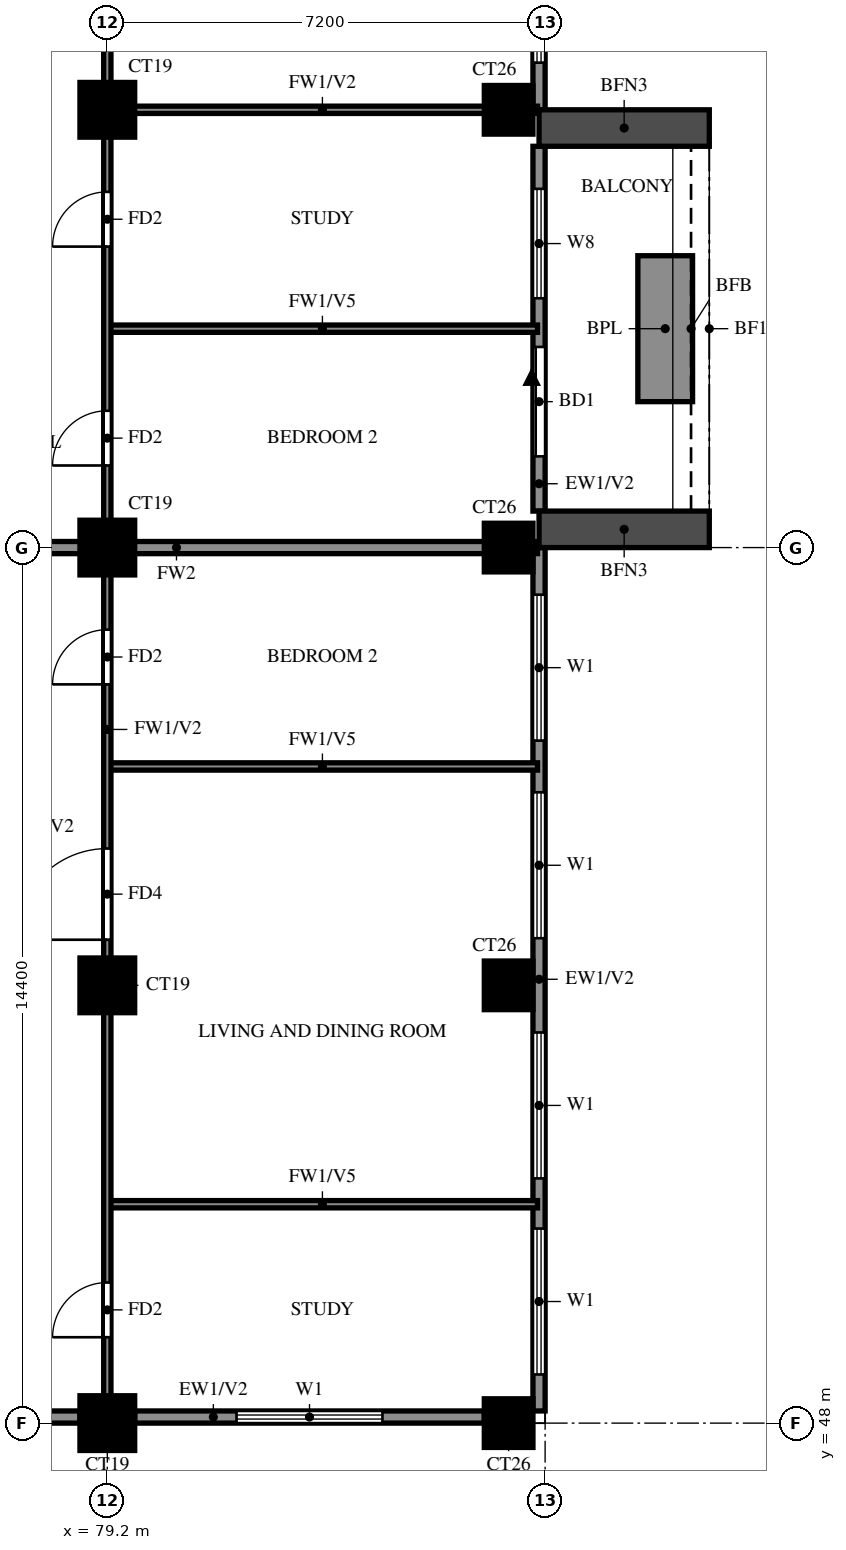
"""IFC4 building model, lengths in metres.
Left out: names, types, materials, properties, quantities, classifications, styles, units other than length and angle.
Written with IfcOpenShell. Run it as: python <this file> out.ifc"""

import sys

from ifc_helpers import new_model, si_unit, direction, frame, frame_2d, origin, origin_2d, place, context, subcontext, project, spatial, rectangle, extrude, source, transform, mapped, element, fill, save


model = new_model("IFC4")
c1 = context("Model", 3, precision=1e-05, world=origin(), true_north=direction((0.0, 1.0)))
c2 = subcontext(c1, "Body", "Model", "MODEL_VIEW")
j1 = project(units=[si_unit("LENGTHUNIT", "METRE"), si_unit("PLANEANGLEUNIT", "RADIAN")], contexts=[c1])
p1 = place(None, origin())
s1 = spatial("IfcSite", under=j1, at=p1, CompositionType="ELEMENT")
p2 = place(p1, origin())
s2 = spatial("IfcBuilding", under=s1, at=p2, CompositionType="ELEMENT")
p3 = place(p2, frame((0.0, 0.0, 192.0)))
s3 = spatial("IfcBuildingStorey", under=s2, at=p3, CompositionType="ELEMENT", Elevation=192.0)
m1 = source(origin(), c2, "Body", "SweptSolid", [
    extrude(rectangle(XDim=0.9, YDim=0.9, at=origin_2d()), origin(), (0.0, 0.0, 1.0), 3.2),
])
p4 = place(p3, frame((79.2, 48.0, 0.0), z_axis=(0.0, 0.0, 1.0), x_axis=(1.0, 0.0, 0.0)))
e1 = element("IfcColumn", 1, at=p4, inside=s3, PredefinedType="COLUMN", context=c2, shape_type="MappedRepresentation", body=[
    mapped(m1, transform((0.0, 0.0, 0.0))),
])
m2 = source(origin(), c2, "Body", "SweptSolid", [
    extrude(rectangle(XDim=0.8, YDim=0.8, at=origin_2d()), origin(), (0.0, 0.0, 1.0), 3.2),
])
p5 = place(p3, frame((85.8, 48.0, 0.0), z_axis=(0.0, 0.0, 1.0), x_axis=(1.0, 0.0, 0.0)))
e2 = element("IfcColumn", 2, at=p5, inside=s3, PredefinedType="COLUMN", context=c2, shape_type="MappedRepresentation", body=[
    mapped(m2, transform((0.0, 0.0, 0.0))),
])
p6 = place(p3, frame((79.2, 55.2, 0.0), z_axis=(0.0, 0.0, 1.0), x_axis=(1.0, 0.0, 0.0)))
e3 = element("IfcColumn", 3, at=p6, inside=s3, PredefinedType="COLUMN", context=c2, shape_type="MappedRepresentation", body=[
    mapped(m1, transform((0.0, 0.0, 0.0))),
])
p7 = place(p3, frame((85.8, 55.2, 0.0), z_axis=(0.0, 0.0, 1.0), x_axis=(1.0, 0.0, 0.0)))
e4 = element("IfcColumn", 4, at=p7, inside=s3, PredefinedType="COLUMN", context=c2, shape_type="MappedRepresentation", body=[
    mapped(m2, transform((0.0, 0.0, 0.0))),
])
p8 = place(p3, frame((79.2, 62.4, 0.0), z_axis=(0.0, 0.0, 1.0), x_axis=(1.0, 0.0, 0.0)))
e5 = element("IfcColumn", 5, at=p8, inside=s3, PredefinedType="COLUMN", context=c2, shape_type="MappedRepresentation", body=[
    mapped(m1, transform((0.0, 0.0, 0.0))),
])
p9 = place(p3, frame((85.8, 62.4, 0.0), z_axis=(0.0, 0.0, 1.0), x_axis=(1.0, 0.0, 0.0)))
e6 = element("IfcColumn", 6, at=p9, inside=s3, PredefinedType="COLUMN", context=c2, shape_type="MappedRepresentation", body=[
    mapped(m2, transform((0.0, 0.0, 0.0))),
])
p10 = place(p3, frame((79.2, 69.6, 0.0), z_axis=(0.0, 0.0, 1.0), x_axis=(1.0, 0.0, 0.0)))
e7 = element("IfcColumn", 7, at=p10, inside=s3, PredefinedType="COLUMN", context=c2, shape_type="MappedRepresentation", body=[
    mapped(m1, transform((0.0, 0.0, 0.0))),
])
p11 = place(p3, frame((85.8, 69.6, 0.0), z_axis=(0.0, 0.0, 1.0), x_axis=(1.0, 0.0, 0.0)))
e8 = element("IfcColumn", 8, at=p11, inside=s3, PredefinedType="COLUMN", context=c2, shape_type="MappedRepresentation", body=[
    mapped(m2, transform((0.0, 0.0, 0.0))),
])
p12 = place(p3, frame((85.719, 39.881, 0.0), z_axis=(0.0, 0.0, 1.0), x_axis=(-0.86377618652, 0.503875678716, 0.0)))
e9 = element("IfcWall", 9, at=p12, inside=s3, PredefinedType="SOLIDWALL", context=c2, shape_type="SweptSolid", body=[
    extrude(rectangle(XDim=16.311, YDim=0.2, at=frame_2d((8.156, 0.0))), origin(), (0.0, 0.0, 1.0), 3.2),
])
p13 = place(p12, frame((13.326, 0.0, 1.5)))
e10 = element("IfcOpeningElement", 10, at=p13, cuts=e9, PredefinedType="OPENING", context=c2, shape_type="SweptSolid", body=[
    extrude(rectangle(XDim=0.9, YDim=0.9, at=frame_2d((0.45, 0.45))), frame((0.0, 0.11, 0.0), z_axis=(0.0, -1.0, 0.0), x_axis=(1.0, 0.0, 0.0)), (0.0, 0.0, 1.0), 0.22),
])
p14 = place(p3, frame((71.99, 48.1, 0.0), z_axis=(0.0, 0.0, 1.0), x_axis=(1.0, 0.0, 0.0)))
e11 = element("IfcWall", 11, at=p14, inside=s3, PredefinedType="SOLIDWALL", context=c2, shape_type="SweptSolid", body=[
    extrude(rectangle(XDim=6.76, YDim=0.2, at=frame_2d((3.38, 0.0))), origin(), (0.0, 0.0, 1.0), 3.2),
])
p15 = place(p14, frame((2.205, 0.0, 1.5)))
e12 = element("IfcOpeningElement", 12, at=p15, cuts=e11, PredefinedType="OPENING", context=c2, shape_type="SweptSolid", body=[
    extrude(rectangle(XDim=0.9, YDim=0.9, at=frame_2d((0.45, 0.45))), frame((0.0, 0.11, 0.0), z_axis=(0.0, -1.0, 0.0), x_axis=(1.0, 0.0, 0.0)), (0.0, 0.0, 1.0), 0.22),
])
p16 = place(p3, frame((79.65, 48.1, 0.0), z_axis=(0.0, 0.0, 1.0), x_axis=(1.0, 0.0, 0.0)))
e13 = element("IfcWall", 13, at=p16, inside=s3, PredefinedType="SOLIDWALL", context=c2, shape_type="SweptSolid", body=[
    extrude(rectangle(XDim=5.75, YDim=0.2, at=frame_2d((2.875, 0.0))), origin(), (0.0, 0.0, 1.0), 3.2),
])
p17 = place(p16, frame((1.675, 0.0, 0.6)))
e14 = element("IfcOpeningElement", 14, at=p17, cuts=e13, PredefinedType="OPENING", context=c2, shape_type="SweptSolid", body=[
    extrude(rectangle(XDim=2.4, YDim=2.4, at=frame_2d((1.2, 1.2))), frame((0.0, 0.11, 0.0), z_axis=(0.0, -1.0, 0.0), x_axis=(1.0, 0.0, 0.0)), (0.0, 0.0, 1.0), 0.22),
])
p18 = place(p3, frame((86.3, 48.2, 0.0), z_axis=(0.0, 0.0, 1.0), x_axis=(0.0, 1.0, 0.0)))
e15 = element("IfcWall", 15, at=p18, inside=s3, PredefinedType="SOLIDWALL", context=c2, shape_type="SweptSolid", body=[
    extrude(rectangle(XDim=14.2, YDim=0.2, at=frame_2d((7.1, 0.0))), origin(), (0.0, 0.0, 1.0), 3.2),
])
p19 = place(p18, frame((0.6, 0.0, 0.6)))
e16 = element("IfcOpeningElement", 16, at=p19, cuts=e15, PredefinedType="OPENING", context=c2, shape_type="SweptSolid", body=[
    extrude(rectangle(XDim=2.4, YDim=2.4, at=frame_2d((1.2, 1.2))), frame((0.0, 0.11, 0.0), z_axis=(0.0, -1.0, 0.0), x_axis=(1.0, 0.0, 0.0)), (0.0, 0.0, 1.0), 0.22),
])
p20 = place(p18, frame((3.825, 0.0, 0.6)))
e17 = element("IfcOpeningElement", 17, at=p20, cuts=e15, PredefinedType="OPENING", context=c2, shape_type="SweptSolid", body=[
    extrude(rectangle(XDim=2.4, YDim=2.4, at=frame_2d((1.2, 1.2))), frame((0.0, 0.11, 0.0), z_axis=(0.0, -1.0, 0.0), x_axis=(1.0, 0.0, 0.0)), (0.0, 0.0, 1.0), 0.22),
])
p21 = place(p18, frame((7.775, 0.0, 0.6)))
e18 = element("IfcOpeningElement", 18, at=p21, cuts=e15, PredefinedType="OPENING", context=c2, shape_type="SweptSolid", body=[
    extrude(rectangle(XDim=2.4, YDim=2.4, at=frame_2d((1.2, 1.2))), frame((0.0, 0.11, 0.0), z_axis=(0.0, -1.0, 0.0), x_axis=(1.0, 0.0, 0.0)), (0.0, 0.0, 1.0), 0.22),
])
p22 = place(p18, frame((11.025, 0.0, 0.6)))
e19 = element("IfcOpeningElement", 19, at=p22, cuts=e15, PredefinedType="OPENING", context=c2, shape_type="SweptSolid", body=[
    extrude(rectangle(XDim=2.4, YDim=2.4, at=frame_2d((1.2, 1.2))), frame((0.0, 0.11, 0.0), z_axis=(0.0, -1.0, 0.0), x_axis=(1.0, 0.0, 0.0)), (0.0, 0.0, 1.0), 0.22),
])
p23 = place(p3, frame((86.3, 63.0, 0.0), z_axis=(0.0, 0.0, 1.0), x_axis=(0.0, 1.0, 0.0)))
e20 = element("IfcWall", 20, at=p23, inside=s3, PredefinedType="SOLIDWALL", context=c2, shape_type="SweptSolid", body=[
    extrude(rectangle(XDim=6.0, YDim=0.2, at=frame_2d((3.0, 0.0))), origin(), (0.0, 0.0, 1.0), 3.2),
])
p24 = place(p23, frame((0.9, 0.0, 0.0)))
e21 = element("IfcOpeningElement", 21, at=p24, cuts=e20, PredefinedType="OPENING", context=c2, shape_type="SweptSolid", body=[
    extrude(rectangle(XDim=1.8, YDim=2.4, at=frame_2d((0.9, 1.2))), frame((0.0, 0.11, 0.0), z_axis=(0.0, -1.0, 0.0), x_axis=(1.0, 0.0, 0.0)), (0.0, 0.0, 1.0), 0.22),
])
p25 = place(p23, frame((3.5, 0.0, 0.6)))
e22 = element("IfcOpeningElement", 22, at=p25, cuts=e20, PredefinedType="OPENING", context=c2, shape_type="SweptSolid", body=[
    extrude(rectangle(XDim=1.8, YDim=2.4, at=frame_2d((0.9, 1.2))), frame((0.0, 0.11, 0.0), z_axis=(0.0, -1.0, 0.0), x_axis=(1.0, 0.0, 0.0)), (0.0, 0.0, 1.0), 0.22),
])
p26 = place(p3, frame((86.3, 69.6, 0.0), z_axis=(0.0, 0.0, 1.0), x_axis=(0.0, 1.0, 0.0)))
e23 = element("IfcWall", 23, at=p26, inside=s3, PredefinedType="SOLIDWALL", context=c2, shape_type="SweptSolid", body=[
    extrude(rectangle(XDim=7.2, YDim=0.2, at=frame_2d((3.6, 0.0))), origin(), (0.0, 0.0, 1.0), 3.2),
])
p27 = place(p26, frame((0.775, 0.0, 0.6)))
e24 = element("IfcOpeningElement", 24, at=p27, cuts=e23, PredefinedType="OPENING", context=c2, shape_type="SweptSolid", body=[
    extrude(rectangle(XDim=2.4, YDim=2.4, at=frame_2d((1.2, 1.2))), frame((0.0, 0.11, 0.0), z_axis=(0.0, -1.0, 0.0), x_axis=(1.0, 0.0, 0.0)), (0.0, 0.0, 1.0), 0.22),
])
p28 = place(p26, frame((4.025, 0.0, 0.6)))
e25 = element("IfcOpeningElement", 25, at=p28, cuts=e23, PredefinedType="OPENING", context=c2, shape_type="SweptSolid", body=[
    extrude(rectangle(XDim=2.4, YDim=2.4, at=frame_2d((1.2, 1.2))), frame((0.0, 0.11, 0.0), z_axis=(0.0, -1.0, 0.0), x_axis=(1.0, 0.0, 0.0)), (0.0, 0.0, 1.0), 0.22),
])
for number, where, z_axis, x_axis in (
    (26, (86.3, 62.7, 0.0), (0.0, 0.0, 1.0), (1.0, 0.0, 0.0)),
    (27, (86.3, 69.3, 0.0), (0.0, 0.0, 1.0), (1.0, 0.0, 0.0)),
):
    element("IfcWall", number, at=place(p3, frame(where, z_axis=z_axis, x_axis=x_axis)), inside=s3, PredefinedType="SOLIDWALL", context=c2, shape_type="SweptSolid", body=[
        extrude(rectangle(XDim=2.8, YDim=0.6, at=frame_2d((1.4, 0.0))), origin(), (0.0, 0.0, 1.0), 2.85),
    ])
p29 = place(p3, frame((88.375, 64.8, 0.0), z_axis=(0.0, 0.0, 1.0), x_axis=(0.0, 1.0, 0.0)))
e28 = element("IfcWall", 28, at=p29, inside=s3, PredefinedType="SOLIDWALL", context=c2, shape_type="SweptSolid", body=[
    extrude(rectangle(XDim=2.4, YDim=0.9, at=frame_2d((1.2, 0.0))), origin(), (0.0, 0.0, 1.0), 0.9),
])
p30 = place(p3, frame((74.4, 62.4, 0.0), z_axis=(0.0, 0.0, 1.0), x_axis=(1.0, 0.0, 0.0)))
e29 = element("IfcWall", 29, at=p30, inside=s3, PredefinedType="SOLIDWALL", context=c2, shape_type="SweptSolid", body=[
    extrude(rectangle(XDim=11.875, YDim=0.2, at=frame_2d((5.938, 0.0))), origin(), (0.0, 0.0, 1.0), 3.2),
])
for number, where, z_axis, x_axis in (
    (30, (79.2, 51.6, 0.0), (0.0, 0.0, 1.0), (1.0, 0.0, 0.0)),
    (31, (79.2, 58.8, 0.0), (0.0, 0.0, 1.0), (1.0, 0.0, 0.0)),
    (32, (79.2, 66.0, 0.0), (0.0, 0.0, 1.0), (1.0, 0.0, 0.0)),
):
    element("IfcWall", number, at=place(p3, frame(where, z_axis=z_axis, x_axis=x_axis)), inside=s3, PredefinedType="PARTITIONING", context=c2, shape_type="SweptSolid", body=[
        extrude(rectangle(XDim=7.075, YDim=0.12, at=frame_2d((3.538, 0.0))), origin(), (0.0, 0.0, 1.0), 2.3),
    ])
p31 = place(p3, frame((79.2, 69.6, 0.0), z_axis=(0.0, 0.0, 1.0), x_axis=(1.0, 0.0, 0.0)))
e33 = element("IfcWall", 33, at=p31, inside=s3, PredefinedType="PARTITIONING", context=c2, shape_type="SweptSolid", body=[
    extrude(rectangle(XDim=7.075, YDim=0.12, at=frame_2d((3.538, 0.0))), origin(), (0.0, 0.0, 1.0), 3.2),
])
p32 = place(p3, frame((79.2, 48.125, 0.0), z_axis=(0.0, 0.0, 1.0), x_axis=(0.0, 1.0, 0.0)))
e34 = element("IfcWall", 34, at=p32, inside=s3, PredefinedType="PARTITIONING", context=c2, shape_type="SweptSolid", body=[
    extrude(rectangle(XDim=25.075, YDim=0.12, at=frame_2d((12.538, 0.0))), origin(), (0.0, 0.0, 1.0), 3.2),
])
p33 = place(p32, frame((1.288, 0.0, 0.0)))
e35 = element("IfcOpeningElement", 35, at=p33, cuts=e34, PredefinedType="OPENING", context=c2, shape_type="SweptSolid", body=[
    extrude(rectangle(XDim=0.9, YDim=2.1, at=frame_2d((0.45, 1.05))), frame((0.0, 0.07, 0.0), z_axis=(0.0, -1.0, 0.0), x_axis=(1.0, 0.0, 0.0)), (0.0, 0.0, 1.0), 0.14),
])
p34 = place(p32, frame((7.825, 0.0, 0.0)))
e36 = element("IfcOpeningElement", 36, at=p34, cuts=e34, PredefinedType="OPENING", context=c2, shape_type="SweptSolid", body=[
    extrude(rectangle(XDim=1.5, YDim=2.1, at=frame_2d((0.75, 1.05))), frame((0.0, 0.07, 0.0), z_axis=(0.0, -1.0, 0.0), x_axis=(1.0, 0.0, 0.0)), (0.0, 0.0, 1.0), 0.14),
])
p35 = place(p32, frame((12.025, 0.0, 0.0)))
e37 = element("IfcOpeningElement", 37, at=p35, cuts=e34, PredefinedType="OPENING", context=c2, shape_type="SweptSolid", body=[
    extrude(rectangle(XDim=0.9, YDim=2.1, at=frame_2d((0.45, 1.05))), frame((0.0, 0.07, 0.0), z_axis=(0.0, -1.0, 0.0), x_axis=(1.0, 0.0, 0.0)), (0.0, 0.0, 1.0), 0.14),
])
p36 = place(p32, frame((15.625, 0.0, 0.0)))
e38 = element("IfcOpeningElement", 38, at=p36, cuts=e34, PredefinedType="OPENING", context=c2, shape_type="SweptSolid", body=[
    extrude(rectangle(XDim=0.9, YDim=2.1, at=frame_2d((0.45, 1.05))), frame((0.0, 0.07, 0.0), z_axis=(0.0, -1.0, 0.0), x_axis=(1.0, 0.0, 0.0)), (0.0, 0.0, 1.0), 0.14),
])
p37 = place(p32, frame((19.225, 0.0, 0.0)))
e39 = element("IfcOpeningElement", 39, at=p37, cuts=e34, PredefinedType="OPENING", context=c2, shape_type="SweptSolid", body=[
    extrude(rectangle(XDim=0.9, YDim=2.1, at=frame_2d((0.45, 1.05))), frame((0.0, 0.07, 0.0), z_axis=(0.0, -1.0, 0.0), x_axis=(1.0, 0.0, 0.0)), (0.0, 0.0, 1.0), 0.14),
])
p38 = place(p32, frame((22.825, 0.0, 0.0)))
e40 = element("IfcOpeningElement", 40, at=p38, cuts=e34, PredefinedType="OPENING", context=c2, shape_type="SweptSolid", body=[
    extrude(rectangle(XDim=0.9, YDim=2.1, at=frame_2d((0.45, 1.05))), frame((0.0, 0.07, 0.0), z_axis=(0.0, -1.0, 0.0), x_axis=(1.0, 0.0, 0.0)), (0.0, 0.0, 1.0), 0.14),
])
p39 = place(p17, origin())
e41 = element("IfcWindow", 41, at=p39, inside=s3, PartitioningType="DOUBLE_PANEL_VERTICAL", PredefinedType="WINDOW", context=c2, shape_type="SweptSolid", body=[
    extrude(rectangle(XDim=2.4, YDim=2.4, at=frame_2d((1.2, 1.2))), frame((0.0, 0.03, 0.0), z_axis=(0.0, -1.0, 0.0), x_axis=(1.0, 0.0, 0.0)), (0.0, 0.0, 1.0), 0.06),
])
fill(e14, e41)
p40 = place(p19, origin())
e42 = element("IfcWindow", 42, at=p40, inside=s3, PartitioningType="DOUBLE_PANEL_VERTICAL", PredefinedType="WINDOW", context=c2, shape_type="SweptSolid", body=[
    extrude(rectangle(XDim=2.4, YDim=2.4, at=frame_2d((1.2, 1.2))), frame((0.0, 0.03, 0.0), z_axis=(0.0, -1.0, 0.0), x_axis=(1.0, 0.0, 0.0)), (0.0, 0.0, 1.0), 0.06),
])
fill(e16, e42)
p41 = place(p20, origin())
e43 = element("IfcWindow", 43, at=p41, inside=s3, PartitioningType="DOUBLE_PANEL_VERTICAL", PredefinedType="WINDOW", context=c2, shape_type="SweptSolid", body=[
    extrude(rectangle(XDim=2.4, YDim=2.4, at=frame_2d((1.2, 1.2))), frame((0.0, 0.03, 0.0), z_axis=(0.0, -1.0, 0.0), x_axis=(1.0, 0.0, 0.0)), (0.0, 0.0, 1.0), 0.06),
])
fill(e17, e43)
p42 = place(p21, origin())
e44 = element("IfcWindow", 44, at=p42, inside=s3, PartitioningType="DOUBLE_PANEL_VERTICAL", PredefinedType="WINDOW", context=c2, shape_type="SweptSolid", body=[
    extrude(rectangle(XDim=2.4, YDim=2.4, at=frame_2d((1.2, 1.2))), frame((0.0, 0.03, 0.0), z_axis=(0.0, -1.0, 0.0), x_axis=(1.0, 0.0, 0.0)), (0.0, 0.0, 1.0), 0.06),
])
fill(e18, e44)
p43 = place(p22, origin())
e45 = element("IfcWindow", 45, at=p43, inside=s3, PartitioningType="DOUBLE_PANEL_VERTICAL", PredefinedType="WINDOW", context=c2, shape_type="SweptSolid", body=[
    extrude(rectangle(XDim=2.4, YDim=2.4, at=frame_2d((1.2, 1.2))), frame((0.0, 0.03, 0.0), z_axis=(0.0, -1.0, 0.0), x_axis=(1.0, 0.0, 0.0)), (0.0, 0.0, 1.0), 0.06),
])
fill(e19, e45)
p44 = place(p24, origin())
e46 = element("IfcDoor", 46, at=p44, inside=s3, OperationType="DOUBLE_DOOR_SLIDING", PredefinedType="DOOR", context=c2, shape_type="SweptSolid", body=[
    extrude(rectangle(XDim=1.8, YDim=2.4, at=frame_2d((0.9, 1.2))), frame((0.0, 0.025, 0.0), z_axis=(0.0, -1.0, 0.0), x_axis=(1.0, 0.0, 0.0)), (0.0, 0.0, 1.0), 0.05),
])
fill(e21, e46)
p45 = place(p25, origin())
e47 = element("IfcWindow", 47, at=p45, inside=s3, PartitioningType="DOUBLE_PANEL_VERTICAL", PredefinedType="WINDOW", context=c2, shape_type="SweptSolid", body=[
    extrude(rectangle(XDim=1.8, YDim=2.4, at=frame_2d((0.9, 1.2))), frame((0.0, 0.03, 0.0), z_axis=(0.0, -1.0, 0.0), x_axis=(1.0, 0.0, 0.0)), (0.0, 0.0, 1.0), 0.06),
])
fill(e22, e47)
p46 = place(p27, origin())
e48 = element("IfcWindow", 48, at=p46, inside=s3, PartitioningType="DOUBLE_PANEL_VERTICAL", PredefinedType="WINDOW", context=c2, shape_type="SweptSolid", body=[
    extrude(rectangle(XDim=2.4, YDim=2.4, at=frame_2d((1.2, 1.2))), frame((0.0, 0.03, 0.0), z_axis=(0.0, -1.0, 0.0), x_axis=(1.0, 0.0, 0.0)), (0.0, 0.0, 1.0), 0.06),
])
fill(e24, e48)
p47 = place(p33, origin())
e49 = element("IfcDoor", 49, at=p47, inside=s3, OperationType="SINGLE_SWING_RIGHT", PredefinedType="DOOR", context=c2, shape_type="SweptSolid", body=[
    extrude(rectangle(XDim=0.9, YDim=2.1, at=frame_2d((0.45, 1.05))), frame((0.0, 0.025, 0.0), z_axis=(0.0, -1.0, 0.0), x_axis=(1.0, 0.0, 0.0)), (0.0, 0.0, 1.0), 0.05),
])
fill(e35, e49)
p48 = place(p34, origin())
e50 = element("IfcDoor", 50, at=p48, inside=s3, OperationType="SINGLE_SWING_RIGHT", PredefinedType="DOOR", context=c2, shape_type="SweptSolid", body=[
    extrude(rectangle(XDim=1.5, YDim=2.1, at=frame_2d((0.75, 1.05))), frame((0.0, 0.025, 0.0), z_axis=(0.0, -1.0, 0.0), x_axis=(1.0, 0.0, 0.0)), (0.0, 0.0, 1.0), 0.05),
])
fill(e36, e50)
p49 = place(p35, origin())
e51 = element("IfcDoor", 51, at=p49, inside=s3, OperationType="SINGLE_SWING_LEFT", PredefinedType="DOOR", context=c2, shape_type="SweptSolid", body=[
    extrude(rectangle(XDim=0.9, YDim=2.1, at=frame_2d((0.45, 1.05))), frame((0.0, 0.025, 0.0), z_axis=(0.0, -1.0, 0.0), x_axis=(1.0, 0.0, 0.0)), (0.0, 0.0, 1.0), 0.05),
])
fill(e37, e51)
p50 = place(p36, origin())
e52 = element("IfcDoor", 52, at=p50, inside=s3, OperationType="SINGLE_SWING_LEFT", PredefinedType="DOOR", context=c2, shape_type="SweptSolid", body=[
    extrude(rectangle(XDim=0.9, YDim=2.1, at=frame_2d((0.45, 1.05))), frame((0.0, 0.025, 0.0), z_axis=(0.0, -1.0, 0.0), x_axis=(1.0, 0.0, 0.0)), (0.0, 0.0, 1.0), 0.05),
])
fill(e38, e52)
p51 = place(p37, origin())
e53 = element("IfcDoor", 53, at=p51, inside=s3, OperationType="SINGLE_SWING_RIGHT", PredefinedType="DOOR", context=c2, shape_type="SweptSolid", body=[
    extrude(rectangle(XDim=0.9, YDim=2.1, at=frame_2d((0.45, 1.05))), frame((0.0, 0.025, 0.0), z_axis=(0.0, -1.0, 0.0), x_axis=(1.0, 0.0, 0.0)), (0.0, 0.0, 1.0), 0.05),
])
fill(e39, e53)
save(model, sys.argv[1])
